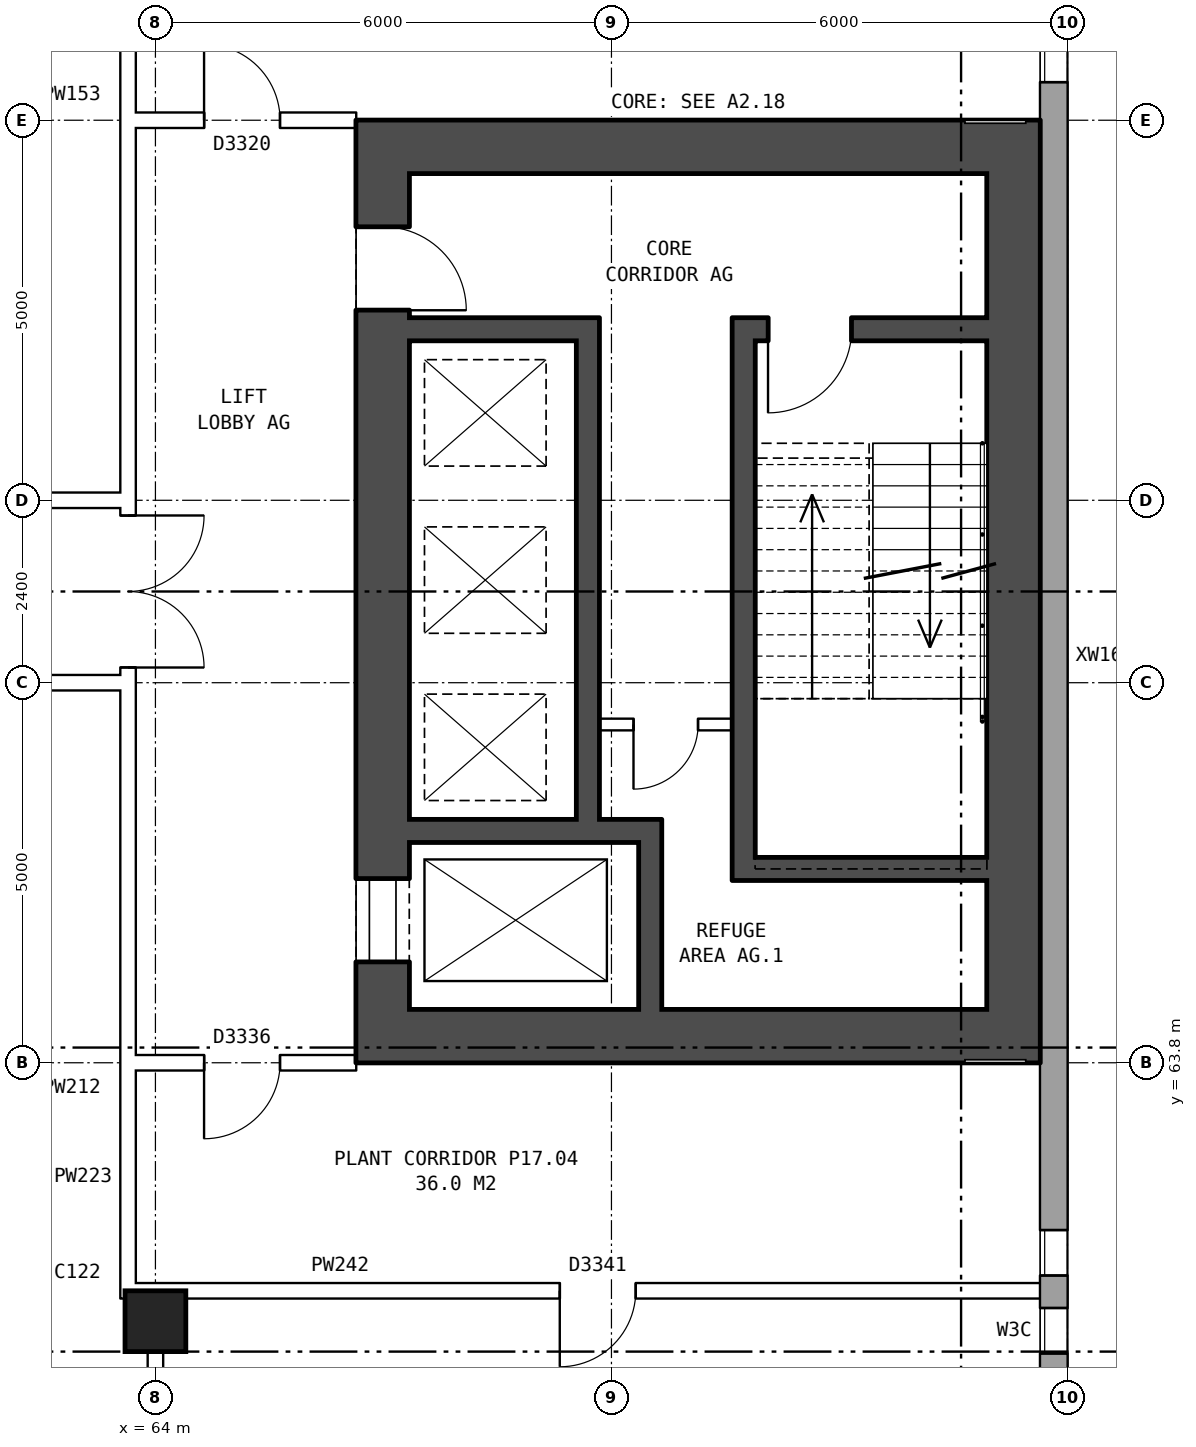
"""IFC4 building model, lengths in metres.
Left out: names, types, materials, properties, quantities, classifications, styles, units other than length and angle.
Written with IfcOpenShell. Run it as: python <this file> out.ifc"""

import sys

from ifc_helpers import new_model, si_unit, direction, frame, frame_2d, origin, origin_2d, place, context, subcontext, project, spatial, rectangle, extrude, element, fill, save


model = new_model("IFC4")
c1 = context("Model", 3, precision=1e-05, world=origin(), true_north=direction((0.0, 1.0)))
c2 = subcontext(c1, "Body", "Model", "MODEL_VIEW")
j1 = project(units=[si_unit("LENGTHUNIT", "METRE"), si_unit("PLANEANGLEUNIT", "RADIAN")], contexts=[c1])
p1 = place(None, origin())
s1 = spatial("IfcSite", under=j1, at=p1, CompositionType="ELEMENT")
p2 = place(p1, origin())
s2 = spatial("IfcBuilding", under=s1, at=p2, CompositionType="ELEMENT")
p3 = place(p2, frame((0.0, 0.0, 62.9)))
s3 = spatial("IfcBuildingStorey", under=s2, at=p3, CompositionType="ELEMENT", Elevation=62.9)
p4 = place(p3, frame((64.0, 60.4, 0.0), z_axis=(0.0, 0.0, 1.0), x_axis=(1.0, 0.0, 0.0)))
e1 = element("IfcColumn", 1, at=p4, inside=s3, PredefinedType="COLUMN", context=c2, shape_type="SweptSolid", body=[
    extrude(rectangle(XDim=0.8, YDim=0.8, at=origin_2d()), origin(), (0.0, 0.0, 1.0), 4.2),
])
p5 = place(p3, frame((75.82, 57.075, 0.0), z_axis=(0.0, 0.0, 1.0), x_axis=(0.0, 1.0, 0.0)))
e2 = element("IfcWall", 2, at=p5, inside=s3, PredefinedType="STANDARD", context=c2, shape_type="SweptSolid", body=[
    extrude(rectangle(XDim=25.851, YDim=0.36, at=frame_2d((12.925, 0.0))), origin(), (0.0, 0.0, 1.0), 4.2),
])
p6 = place(p5, frame((2.9, 0.0, 1.5)))
e3 = element("IfcOpeningElement", 3, at=p6, cuts=e2, PredefinedType="OPENING", context=c2, shape_type="SweptSolid", body=[
    extrude(rectangle(XDim=0.6, YDim=1.2, at=frame_2d((0.3, 0.6))), frame((0.0, 0.19, 0.0), z_axis=(0.0, -1.0, 0.0), x_axis=(1.0, 0.0, 0.0)), (0.0, 0.0, 1.0), 0.38),
])
p7 = place(p5, frame((3.925, 0.0, 1.5)))
e4 = element("IfcOpeningElement", 4, at=p7, cuts=e2, PredefinedType="OPENING", context=c2, shape_type="SweptSolid", body=[
    extrude(rectangle(XDim=0.6, YDim=1.2, at=frame_2d((0.3, 0.6))), frame((0.0, 0.19, 0.0), z_axis=(0.0, -1.0, 0.0), x_axis=(1.0, 0.0, 0.0)), (0.0, 0.0, 1.0), 0.38),
])
p8 = place(p5, frame((19.625, 0.0, 1.5)))
e5 = element("IfcOpeningElement", 5, at=p8, cuts=e2, PredefinedType="OPENING", context=c2, shape_type="SweptSolid", body=[
    extrude(rectangle(XDim=1.6, YDim=1.2, at=frame_2d((0.8, 0.6))), frame((0.0, 0.19, 0.0), z_axis=(0.0, -1.0, 0.0), x_axis=(1.0, 0.0, 0.0)), (0.0, 0.0, 1.0), 0.38),
])
p9 = place(p5, frame((22.325, 0.0, 1.5)))
e6 = element("IfcOpeningElement", 6, at=p9, cuts=e2, PredefinedType="OPENING", context=c2, shape_type="SweptSolid", body=[
    extrude(rectangle(XDim=0.6, YDim=1.2, at=frame_2d((0.3, 0.6))), frame((0.0, 0.19, 0.0), z_axis=(0.0, -1.0, 0.0), x_axis=(1.0, 0.0, 0.0)), (0.0, 0.0, 1.0), 0.38),
])
p10 = place(p3, frame((66.99, 64.5, 0.0), z_axis=(0.0, 0.0, 1.0), x_axis=(0.0, 1.0, 0.0)))
e7 = element("IfcWall", 7, at=p10, inside=s3, PredefinedType="SHEAR", context=c2, shape_type="SweptSolid", body=[
    extrude(rectangle(XDim=11.0, YDim=0.7, at=frame_2d((5.5, 0.0))), origin(), (0.0, 0.0, 1.0), 4.2),
])
p11 = place(p10, frame((0.625, 0.0, 0.0)))
e8 = element("IfcOpeningElement", 8, at=p11, cuts=e7, PredefinedType="OPENING", context=c2, shape_type="SweptSolid", body=[
    extrude(rectangle(XDim=1.1, YDim=2.1, at=frame_2d((0.55, 1.05))), frame((0.0, 0.36, 0.0), z_axis=(0.0, -1.0, 0.0), x_axis=(1.0, 0.0, 0.0)), (0.0, 0.0, 1.0), 0.72),
])
p12 = place(p10, frame((9.2, 0.0, 0.0)))
e9 = element("IfcOpeningElement", 9, at=p12, cuts=e7, PredefinedType="OPENING", context=c2, shape_type="SweptSolid", body=[
    extrude(rectangle(XDim=1.1, YDim=2.1, at=frame_2d((0.55, 1.05))), frame((0.0, 0.36, 0.0), z_axis=(0.0, -1.0, 0.0), x_axis=(1.0, 0.0, 0.0)), (0.0, 0.0, 1.0), 0.72),
])
p13 = place(p3, frame((75.29, 64.5, 0.0), z_axis=(0.0, 0.0, 1.0), x_axis=(0.0, 1.0, 0.0)))
e10 = element("IfcWall", 10, at=p13, inside=s3, PredefinedType="SHEAR", context=c2, shape_type="SweptSolid", body=[
    extrude(rectangle(XDim=11.0, YDim=0.7, at=frame_2d((5.5, 0.0))), origin(), (0.0, 0.0, 1.0), 4.2),
])
for number, where, z_axis, x_axis in (
    (11, (66.64, 64.15, 0.0), (0.0, 0.0, 1.0), (1.0, 0.0, 0.0)),
    (12, (66.64, 75.85, 0.0), (0.0, 0.0, 1.0), (1.0, 0.0, 0.0)),
):
    element("IfcWall", number, at=place(p3, frame(where, z_axis=z_axis, x_axis=x_axis)), inside=s3, PredefinedType="SHEAR", context=c2, shape_type="SweptSolid", body=[
        extrude(rectangle(XDim=9.0, YDim=0.7, at=frame_2d((4.5, 0.0))), origin(), (0.0, 0.0, 1.0), 4.2),
    ])
p14 = place(p3, frame((71.89, 66.35, 0.0), z_axis=(0.0, 0.0, 1.0), x_axis=(1.0, 0.0, 0.0)))
e13 = element("IfcWall", 13, at=p14, inside=s3, PredefinedType="SHEAR", context=c2, shape_type="SweptSolid", body=[
    extrude(rectangle(XDim=3.05, YDim=0.3, at=frame_2d((1.525, 0.0))), origin(), (0.0, 0.0, 1.0), 4.2),
])
p15 = place(p3, frame((67.34, 66.85, 0.0), z_axis=(0.0, 0.0, 1.0), x_axis=(1.0, 0.0, 0.0)))
e14 = element("IfcWall", 14, at=p15, inside=s3, PredefinedType="SHEAR", context=c2, shape_type="SweptSolid", body=[
    extrude(rectangle(XDim=3.32, YDim=0.3, at=frame_2d((1.66, 0.0))), origin(), (0.0, 0.0, 1.0), 4.2),
])
p16 = place(p3, frame((69.84, 68.25, 0.0), z_axis=(0.0, 0.0, 1.0), x_axis=(1.0, 0.0, 0.0)))
e15 = element("IfcWall", 15, at=p16, inside=s3, PredefinedType="PARTITIONING", context=c2, shape_type="SweptSolid", body=[
    extrude(rectangle(XDim=1.75, YDim=0.15, at=frame_2d((0.875, 0.0))), origin(), (0.0, 0.0, 1.0), 4.2),
])
p17 = place(p16, frame((0.45, 0.0, 0.0)))
e16 = element("IfcOpeningElement", 16, at=p17, cuts=e15, PredefinedType="OPENING", context=c2, shape_type="SweptSolid", body=[
    extrude(rectangle(XDim=0.85, YDim=2.1, at=frame_2d((0.425, 1.05))), frame((0.0, 0.085, 0.0), z_axis=(0.0, -1.0, 0.0), x_axis=(1.0, 0.0, 0.0)), (0.0, 0.0, 1.0), 0.17),
])
p18 = place(p3, frame((67.34, 73.45, 0.0), z_axis=(0.0, 0.0, 1.0), x_axis=(1.0, 0.0, 0.0)))
e17 = element("IfcWall", 17, at=p18, inside=s3, PredefinedType="SHEAR", context=c2, shape_type="SweptSolid", body=[
    extrude(rectangle(XDim=2.2, YDim=0.3, at=frame_2d((1.1, 0.0))), origin(), (0.0, 0.0, 1.0), 4.2),
])
p19 = place(p3, frame((71.89, 73.45, 0.0), z_axis=(0.0, 0.0, 1.0), x_axis=(1.0, 0.0, 0.0)))
e18 = element("IfcWall", 18, at=p19, inside=s3, PredefinedType="SHEAR", context=c2, shape_type="SweptSolid", body=[
    extrude(rectangle(XDim=3.05, YDim=0.3, at=frame_2d((1.525, 0.0))), origin(), (0.0, 0.0, 1.0), 4.2),
])
p20 = place(p19, frame((0.17, 0.0, 0.0)))
e19 = element("IfcOpeningElement", 19, at=p20, cuts=e18, PredefinedType="OPENING", context=c2, shape_type="SweptSolid", body=[
    extrude(rectangle(XDim=1.1, YDim=2.1, at=frame_2d((0.55, 1.05))), frame((0.0, 0.16, 0.0), z_axis=(0.0, -1.0, 0.0), x_axis=(1.0, 0.0, 0.0)), (0.0, 0.0, 1.0), 0.32),
])
p21 = place(p3, frame((69.69, 67.0, 0.0), z_axis=(0.0, 0.0, 1.0), x_axis=(0.0, 1.0, 0.0)))
e20 = element("IfcWall", 20, at=p21, inside=s3, PredefinedType="SHEAR", context=c2, shape_type="SweptSolid", body=[
    extrude(rectangle(XDim=6.6, YDim=0.3, at=frame_2d((3.3, 0.0))), origin(), (0.0, 0.0, 1.0), 4.2),
])
p22 = place(p3, frame((70.51, 64.5, 0.0), z_axis=(0.0, 0.0, 1.0), x_axis=(0.0, 1.0, 0.0)))
e21 = element("IfcWall", 21, at=p22, inside=s3, PredefinedType="SHEAR", context=c2, shape_type="SweptSolid", body=[
    extrude(rectangle(XDim=2.2, YDim=0.3, at=frame_2d((1.1, 0.0))), origin(), (0.0, 0.0, 1.0), 4.2),
])
p23 = place(p3, frame((71.74, 66.2, 0.0), z_axis=(0.0, 0.0, 1.0), x_axis=(0.0, 1.0, 0.0)))
e22 = element("IfcWall", 22, at=p23, inside=s3, PredefinedType="SHEAR", context=c2, shape_type="SweptSolid", body=[
    extrude(rectangle(XDim=7.4, YDim=0.3, at=frame_2d((3.7, 0.0))), origin(), (0.0, 0.0, 1.0), 4.2),
])
p24 = place(p3, frame((63.64, 63.9, 0.0), z_axis=(0.0, 0.0, 1.0), x_axis=(0.0, 1.0, 0.0)))
e23 = element("IfcWall", 23, at=p24, inside=s3, PredefinedType="PARTITIONING", context=c2, shape_type="SweptSolid", body=[
    extrude(rectangle(XDim=12.2, YDim=0.2, at=frame_2d((6.1, 0.0))), origin(), (0.0, 0.0, 1.0), 4.2),
])
p25 = place(p24, frame((5.1, 0.0, 0.0)))
e24 = element("IfcOpeningElement", 24, at=p25, cuts=e23, PredefinedType="OPENING", context=c2, shape_type="SweptSolid", body=[
    extrude(rectangle(XDim=2.0, YDim=2.1, at=frame_2d((1.0, 1.05))), frame((0.0, 0.11, 0.0), z_axis=(0.0, -1.0, 0.0), x_axis=(1.0, 0.0, 0.0)), (0.0, 0.0, 1.0), 0.22),
])
p26 = place(p3, frame((63.54, 60.8, 0.0), z_axis=(0.0, 0.0, 1.0), x_axis=(1.0, 0.0, 0.0)))
e25 = element("IfcWall", 25, at=p26, inside=s3, PredefinedType="PARTITIONING", context=c2, shape_type="SweptSolid", body=[
    extrude(rectangle(XDim=12.22, YDim=0.2, at=frame_2d((6.11, 0.0))), origin(), (0.0, 0.0, 1.0), 4.2),
])
p27 = place(p26, frame((5.78, 0.0, 0.0)))
e26 = element("IfcOpeningElement", 26, at=p27, cuts=e25, PredefinedType="OPENING", context=c2, shape_type="SweptSolid", body=[
    extrude(rectangle(XDim=1.0, YDim=2.1, at=frame_2d((0.5, 1.05))), frame((0.0, 0.11, 0.0), z_axis=(0.0, -1.0, 0.0), x_axis=(1.0, 0.0, 0.0)), (0.0, 0.0, 1.0), 0.22),
])
p28 = place(p3, frame((63.54, 63.8, 0.0), z_axis=(0.0, 0.0, 1.0), x_axis=(1.0, 0.0, 0.0)))
e27 = element("IfcWall", 27, at=p28, inside=s3, PredefinedType="PARTITIONING", context=c2, shape_type="SweptSolid", body=[
    extrude(rectangle(XDim=3.1, YDim=0.2, at=frame_2d((1.55, 0.0))), origin(), (0.0, 0.0, 1.0), 4.2),
])
p29 = place(p28, frame((1.1, 0.0, 0.0)))
e28 = element("IfcOpeningElement", 28, at=p29, cuts=e27, PredefinedType="OPENING", context=c2, shape_type="SweptSolid", body=[
    extrude(rectangle(XDim=1.0, YDim=2.1, at=frame_2d((0.5, 1.05))), frame((0.0, 0.11, 0.0), z_axis=(0.0, -1.0, 0.0), x_axis=(1.0, 0.0, 0.0)), (0.0, 0.0, 1.0), 0.22),
])
p30 = place(p3, frame((44.36, 68.8, 0.0), z_axis=(0.0, 0.0, 1.0), x_axis=(1.0, 0.0, 0.0)))
e29 = element("IfcWall", 29, at=p30, inside=s3, PredefinedType="PARTITIONING", context=c2, shape_type="SweptSolid", body=[
    extrude(rectangle(XDim=19.28, YDim=0.2, at=frame_2d((9.64, 0.0))), origin(), (0.0, 0.0, 1.0), 4.2),
])
p31 = place(p30, frame((10.14, 0.0, 0.0)))
e30 = element("IfcOpeningElement", 30, at=p31, cuts=e29, PredefinedType="OPENING", context=c2, shape_type="SweptSolid", body=[
    extrude(rectangle(XDim=1.0, YDim=2.1, at=frame_2d((0.5, 1.05))), frame((0.0, 0.11, 0.0), z_axis=(0.0, -1.0, 0.0), x_axis=(1.0, 0.0, 0.0)), (0.0, 0.0, 1.0), 0.22),
])
p32 = place(p30, frame((15.96, 0.0, 0.0)))
e31 = element("IfcOpeningElement", 31, at=p32, cuts=e29, PredefinedType="OPENING", context=c2, shape_type="SweptSolid", body=[
    extrude(rectangle(XDim=1.0, YDim=2.1, at=frame_2d((0.5, 1.05))), frame((0.0, 0.11, 0.0), z_axis=(0.0, -1.0, 0.0), x_axis=(1.0, 0.0, 0.0)), (0.0, 0.0, 1.0), 0.22),
])
p33 = place(p3, frame((44.36, 71.2, 0.0), z_axis=(0.0, 0.0, 1.0), x_axis=(1.0, 0.0, 0.0)))
e32 = element("IfcWall", 32, at=p33, inside=s3, PredefinedType="PARTITIONING", context=c2, shape_type="SweptSolid", body=[
    extrude(rectangle(XDim=19.28, YDim=0.2, at=frame_2d((9.64, 0.0))), origin(), (0.0, 0.0, 1.0), 4.2),
])
p34 = place(p33, frame((8.64, 0.0, 0.0)))
e33 = element("IfcOpeningElement", 33, at=p34, cuts=e32, PredefinedType="OPENING", context=c2, shape_type="SweptSolid", body=[
    extrude(rectangle(XDim=1.0, YDim=2.1, at=frame_2d((0.5, 1.05))), frame((0.0, 0.11, 0.0), z_axis=(0.0, -1.0, 0.0), x_axis=(1.0, 0.0, 0.0)), (0.0, 0.0, 1.0), 0.22),
])
p35 = place(p33, frame((15.46, 0.0, 0.0)))
e34 = element("IfcOpeningElement", 34, at=p35, cuts=e32, PredefinedType="OPENING", context=c2, shape_type="SweptSolid", body=[
    extrude(rectangle(XDim=1.0, YDim=2.1, at=frame_2d((0.5, 1.05))), frame((0.0, 0.11, 0.0), z_axis=(0.0, -1.0, 0.0), x_axis=(1.0, 0.0, 0.0)), (0.0, 0.0, 1.0), 0.22),
])
p36 = place(p3, frame((63.54, 76.2, 0.0), z_axis=(0.0, 0.0, 1.0), x_axis=(1.0, 0.0, 0.0)))
e35 = element("IfcWall", 35, at=p36, inside=s3, PredefinedType="PARTITIONING", context=c2, shape_type="SweptSolid", body=[
    extrude(rectangle(XDim=3.1, YDim=0.2, at=frame_2d((1.55, 0.0))), origin(), (0.0, 0.0, 1.0), 4.2),
])
p37 = place(p36, frame((1.1, 0.0, 0.0)))
e36 = element("IfcOpeningElement", 36, at=p37, cuts=e35, PredefinedType="OPENING", context=c2, shape_type="SweptSolid", body=[
    extrude(rectangle(XDim=1.0, YDim=2.1, at=frame_2d((0.5, 1.05))), frame((0.0, 0.11, 0.0), z_axis=(0.0, -1.0, 0.0), x_axis=(1.0, 0.0, 0.0)), (0.0, 0.0, 1.0), 0.22),
])
for number, where, z_axis, x_axis in (
    (37, (63.64, 60.7, 0.0), (0.0, 0.0, 1.0), (0.0, 1.0, 0.0)),
    (38, (63.64, 76.1, 0.0), (0.0, 0.0, 1.0), (0.0, 1.0, 0.0)),
):
    element("IfcWall", number, at=place(p3, frame(where, z_axis=z_axis, x_axis=x_axis)), inside=s3, PredefinedType="PARTITIONING", context=c2, shape_type="SweptSolid", body=[
        extrude(rectangle(XDim=3.2, YDim=0.2, at=frame_2d((1.6, 0.0))), origin(), (0.0, 0.0, 1.0), 4.2),
    ])
p38 = place(p3, frame((64.0, 54.24, 0.0), z_axis=(0.0, 0.0, 1.0), x_axis=(0.0, 1.0, 0.0)))
e39 = element("IfcWall", 39, at=p38, inside=s3, PredefinedType="PARTITIONING", context=c2, shape_type="SweptSolid", body=[
    extrude(rectangle(XDim=6.66, YDim=0.2, at=frame_2d((3.33, 0.0))), origin(), (0.0, 0.0, 1.0), 4.2),
])
p39 = place(p6, origin())
e40 = element("IfcWindow", 40, at=p39, inside=s3, PartitioningType="DOUBLE_PANEL_HORIZONTAL", PredefinedType="WINDOW", context=c2, shape_type="SweptSolid", body=[
    extrude(rectangle(XDim=0.6, YDim=1.2, at=frame_2d((0.3, 0.6))), frame((0.0, 0.15, 0.0), z_axis=(0.0, -1.0, 0.0), x_axis=(1.0, 0.0, 0.0)), (0.0, 0.0, 1.0), 0.06),
])
fill(e3, e40)
p40 = place(p7, origin())
e41 = element("IfcWindow", 41, at=p40, inside=s3, PartitioningType="DOUBLE_PANEL_HORIZONTAL", PredefinedType="WINDOW", context=c2, shape_type="SweptSolid", body=[
    extrude(rectangle(XDim=0.6, YDim=1.2, at=frame_2d((0.3, 0.6))), frame((0.0, 0.15, 0.0), z_axis=(0.0, -1.0, 0.0), x_axis=(1.0, 0.0, 0.0)), (0.0, 0.0, 1.0), 0.06),
])
fill(e4, e41)
p41 = place(p8, origin())
e42 = element("IfcWindow", 42, at=p41, inside=s3, PartitioningType="DOUBLE_PANEL_HORIZONTAL", PredefinedType="WINDOW", context=c2, shape_type="SweptSolid", body=[
    extrude(rectangle(XDim=1.6, YDim=1.2, at=frame_2d((0.8, 0.6))), frame((0.0, 0.15, 0.0), z_axis=(0.0, -1.0, 0.0), x_axis=(1.0, 0.0, 0.0)), (0.0, 0.0, 1.0), 0.06),
])
fill(e5, e42)
p42 = place(p11, origin())
e43 = element("IfcDoor", 43, at=p42, inside=s3, OperationType="DOUBLE_DOOR_SLIDING", PredefinedType="DOOR", context=c2, shape_type="SweptSolid", body=[
    extrude(rectangle(XDim=1.1, YDim=2.1, at=frame_2d((0.55, 1.05))), frame((0.0, -0.285, 0.0), z_axis=(0.0, -1.0, 0.0), x_axis=(1.0, 0.0, 0.0)), (0.0, 0.0, 1.0), 0.05),
])
fill(e8, e43)
p43 = place(p12, frame((1.1, 0.0, 0.0), z_axis=(0.0, 0.0, 1.0), x_axis=(-1.0, 0.0, 0.0)))
e44 = element("IfcDoor", 44, at=p43, inside=s3, OperationType="SINGLE_SWING_RIGHT", PredefinedType="DOOR", context=c2, shape_type="SweptSolid", body=[
    extrude(rectangle(XDim=1.1, YDim=2.1, at=frame_2d((0.55, 1.05))), frame((0.0, 0.335, 0.0), z_axis=(0.0, -1.0, 0.0), x_axis=(1.0, 0.0, 0.0)), (0.0, 0.0, 1.0), 0.05),
])
fill(e9, e44)
p44 = place(p20, frame((1.1, 0.0, 0.0), z_axis=(0.0, 0.0, 1.0), x_axis=(-1.0, 0.0, 0.0)))
e45 = element("IfcDoor", 45, at=p44, inside=s3, OperationType="SINGLE_SWING_RIGHT", PredefinedType="DOOR", context=c2, shape_type="SweptSolid", body=[
    extrude(rectangle(XDim=1.1, YDim=2.1, at=frame_2d((0.55, 1.05))), frame((0.0, 0.025, 0.0), z_axis=(0.0, -1.0, 0.0), x_axis=(1.0, 0.0, 0.0)), (0.0, 0.0, 1.0), 0.05),
])
fill(e19, e45)
p45 = place(p17, frame((0.85, 0.0, 0.0), z_axis=(0.0, 0.0, 1.0), x_axis=(-1.0, 0.0, 0.0)))
e46 = element("IfcDoor", 46, at=p45, inside=s3, OperationType="SINGLE_SWING_RIGHT", PredefinedType="DOOR", context=c2, shape_type="SweptSolid", body=[
    extrude(rectangle(XDim=0.85, YDim=2.1, at=frame_2d((0.425, 1.05))), frame((0.0, 0.025, 0.0), z_axis=(0.0, -1.0, 0.0), x_axis=(1.0, 0.0, 0.0)), (0.0, 0.0, 1.0), 0.05),
])
fill(e16, e46)
p46 = place(p25, frame((2.0, 0.0, 0.0), z_axis=(0.0, 0.0, 1.0), x_axis=(-1.0, 0.0, 0.0)))
e47 = element("IfcDoor", 47, at=p46, inside=s3, OperationType="DOUBLE_DOOR_SINGLE_SWING", PredefinedType="DOOR", context=c2, shape_type="SweptSolid", body=[
    extrude(rectangle(XDim=2.0, YDim=2.1, at=frame_2d((1.0, 1.05))), frame((0.0, 0.025, 0.0), z_axis=(0.0, -1.0, 0.0), x_axis=(1.0, 0.0, 0.0)), (0.0, 0.0, 1.0), 0.05),
])
fill(e24, e47)
p47 = place(p27, frame((1.0, 0.0, 0.0), z_axis=(0.0, 0.0, 1.0), x_axis=(-1.0, 0.0, 0.0)))
e48 = element("IfcDoor", 48, at=p47, inside=s3, OperationType="SINGLE_SWING_RIGHT", PredefinedType="DOOR", context=c2, shape_type="SweptSolid", body=[
    extrude(rectangle(XDim=1.0, YDim=2.1, at=frame_2d((0.5, 1.05))), frame((0.0, 0.025, 0.0), z_axis=(0.0, -1.0, 0.0), x_axis=(1.0, 0.0, 0.0)), (0.0, 0.0, 1.0), 0.05),
])
fill(e26, e48)
p48 = place(p29, frame((1.0, 0.0, 0.0), z_axis=(0.0, 0.0, 1.0), x_axis=(-1.0, 0.0, 0.0)))
e49 = element("IfcDoor", 49, at=p48, inside=s3, OperationType="SINGLE_SWING_RIGHT", PredefinedType="DOOR", context=c2, shape_type="SweptSolid", body=[
    extrude(rectangle(XDim=1.0, YDim=2.1, at=frame_2d((0.5, 1.05))), frame((0.0, 0.025, 0.0), z_axis=(0.0, -1.0, 0.0), x_axis=(1.0, 0.0, 0.0)), (0.0, 0.0, 1.0), 0.05),
])
fill(e28, e49)
p49 = place(p37, origin())
e50 = element("IfcDoor", 50, at=p49, inside=s3, OperationType="SINGLE_SWING_LEFT", PredefinedType="DOOR", context=c2, shape_type="SweptSolid", body=[
    extrude(rectangle(XDim=1.0, YDim=2.1, at=frame_2d((0.5, 1.05))), frame((0.0, 0.025, 0.0), z_axis=(0.0, -1.0, 0.0), x_axis=(1.0, 0.0, 0.0)), (0.0, 0.0, 1.0), 0.05),
])
fill(e36, e50)
save(model, sys.argv[1])
